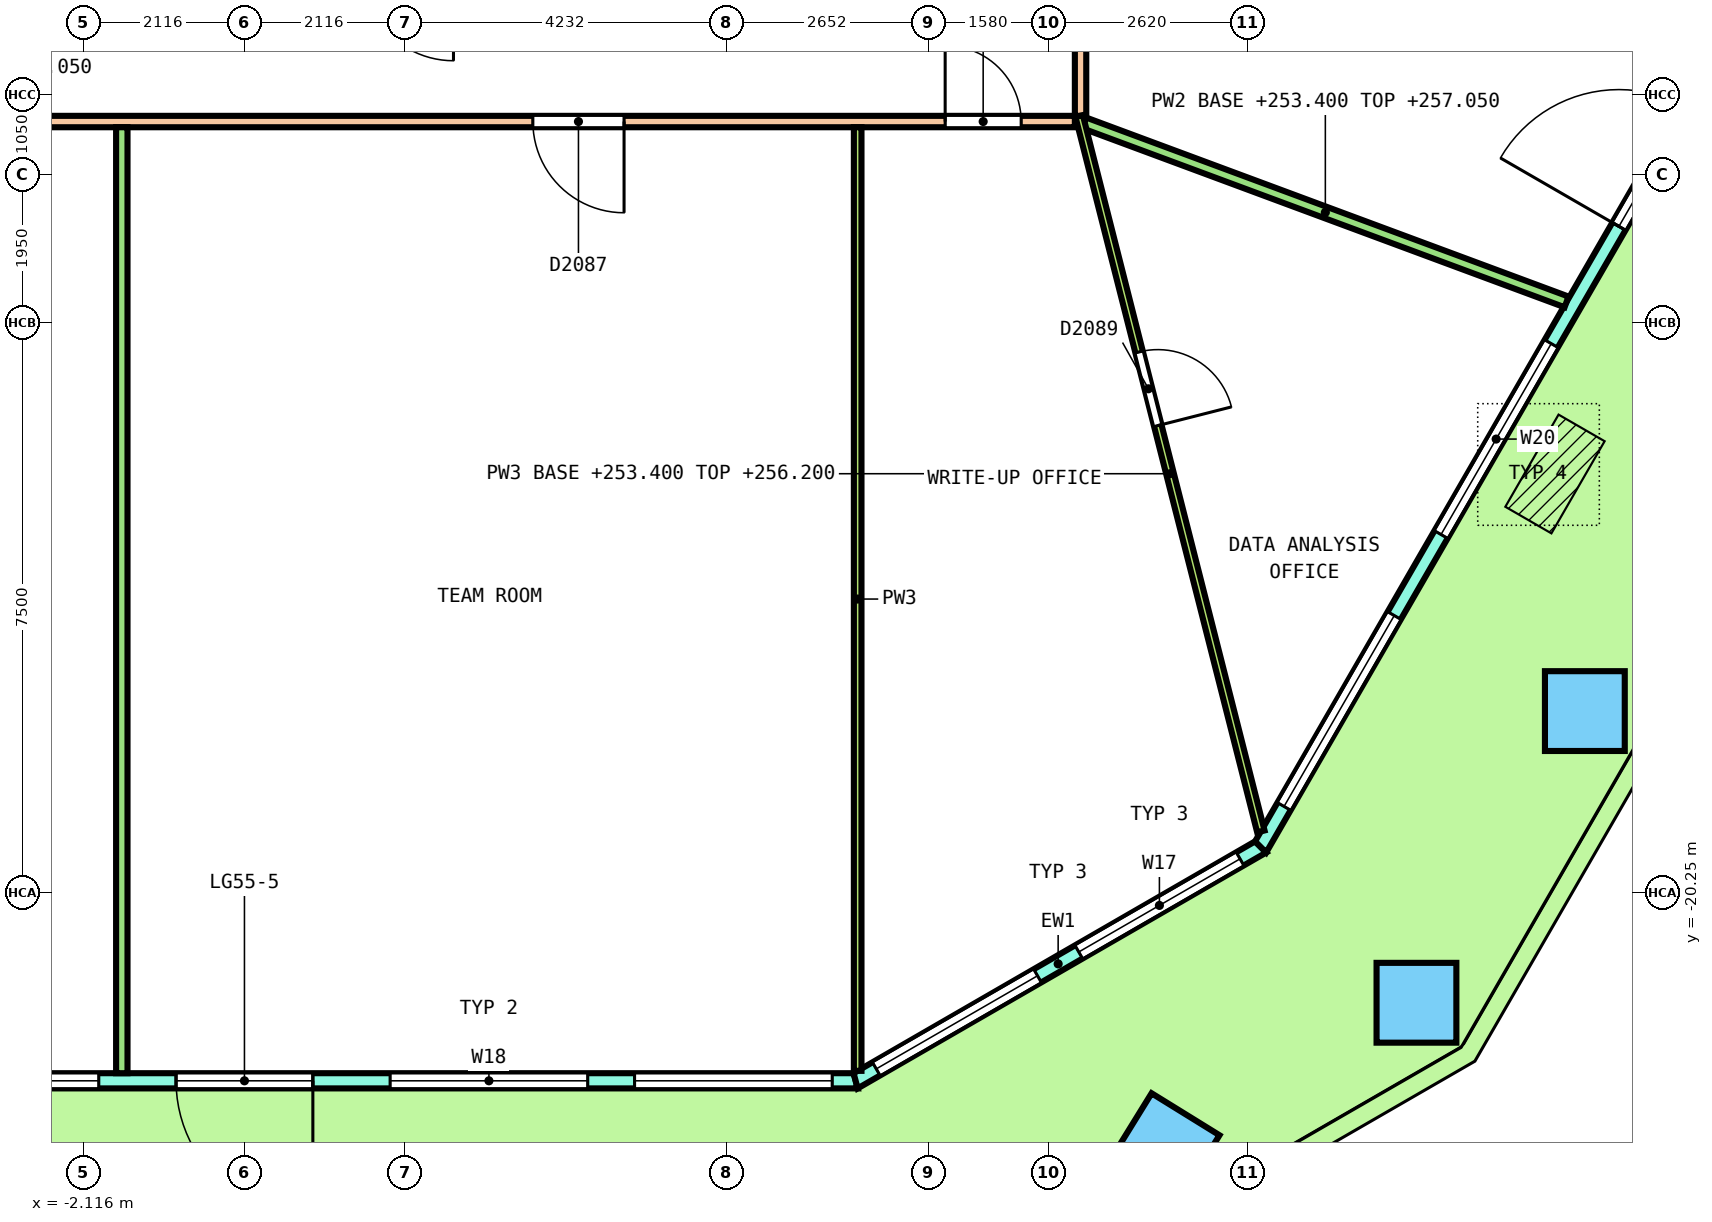
"""IFC4 building model, lengths in metres.
Left out: names, types, materials, properties, quantities, classifications, styles, units other than length and angle.
Written with IfcOpenShell. Run it as: python <this file> out.ifc"""

import sys

from ifc_helpers import new_model, si_unit, direction, frame, frame_2d, origin, origin_2d, place, context, subcontext, project, spatial, polyline, rectangle, outline, extrude, element, fill, save


model = new_model("IFC4")
c1 = context("Model", 3, precision=1e-05, world=origin(), true_north=direction((0.0, 1.0)))
c2 = subcontext(c1, "Body", "Model", "MODEL_VIEW")
j1 = project(units=[si_unit("LENGTHUNIT", "METRE"), si_unit("PLANEANGLEUNIT", "RADIAN")], contexts=[c1])
p1 = place(None, origin())
s1 = spatial("IfcSite", under=j1, at=p1, CompositionType="ELEMENT")
p2 = place(p1, origin())
s2 = spatial("IfcBuilding", under=s1, at=p2, CompositionType="ELEMENT")
p3 = place(p2, frame((0.0, 0.0, 253.4)))
s3 = spatial("IfcBuildingStorey", under=s2, at=p3, CompositionType="ELEMENT", Elevation=253.4)
for number, where, z_axis, x_axis in (
    (1, (12.105, -23.606, 0.0), (0.178, 0.308, 0.934), (0.853, 0.426, -0.303)),
    (2, (15.419, -21.693, 0.0), (0.178, 0.308, 0.934), (0.467, 0.809, -0.356)),
):
    element("IfcColumn", number, at=place(p3, frame(where, z_axis=z_axis, x_axis=x_axis)), inside=s3, PredefinedType="COLUMN", context=c2, shape_type="SweptSolid", body=[
        extrude(rectangle(XDim=1.05, YDim=1.05, at=origin_2d()), origin(), (0.0, 0.0, 1.0), 3.895),
    ])
p4 = place(p3, frame((17.635, -17.856, 0.0), z_axis=(0.111476147864, 0.193007383282, 0.974844202145), x_axis=(0.48748245992, 0.844204992977, -0.222887373134)))
e3 = element("IfcColumn", 3, at=p4, inside=s3, PredefinedType="COLUMN", context=c2, shape_type="SweptSolid", body=[
    extrude(rectangle(XDim=1.05, YDim=1.05, at=origin_2d()), origin(), (0.0, 0.0, 1.0), 3.734),
])
p5 = place(p3, frame((-8.041, -22.72, 0.0), z_axis=(0.0, 0.0, 1.0), x_axis=(1.0, 0.0, 0.0)))
e4 = element("IfcWall", 4, at=p5, inside=s3, PredefinedType="SOLIDWALL", context=c2, shape_type="SweptSolid", body=[
    extrude(outline(polyline([(-0.027, -0.1), (0.982, -0.1), (1.99, -0.1), (2.999, -0.1), (4.007, -0.1), (5.016, -0.1), (6.024, -0.1), (7.032, -0.1), (8.041, -0.1), (9.05, -0.1), (10.058, -0.1), (11.066, -0.1), (12.075, -0.1), (13.083, -0.1), (14.092, -0.1), (15.1, -0.1), (16.109, -0.1), (16.055, 0.1), (15.053, 0.1), (14.052, 0.1), (13.05, 0.1), (12.048, 0.1), (11.046, 0.1), (10.044, 0.1), (9.043, 0.1), (8.041, 0.1), (7.039, 0.1), (6.038, 0.1), (5.036, 0.1), (4.034, 0.1), (3.032, 0.1), (2.03, 0.1), (1.029, 0.1), (0.027, 0.1), (-0.027, -0.1)])), origin(), (0.0, 0.0, 1.0), 3.7),
])
p6 = place(p5, frame((0.308, 0.0, 0.1)))
e5 = element("IfcOpeningElement", 5, at=p6, cuts=e4, PredefinedType="OPENING", context=c2, shape_type="SweptSolid", body=[
    extrude(rectangle(XDim=2.6, YDim=2.65, at=frame_2d((1.3, 1.325))), frame((0.0, 0.11, 0.0), z_axis=(0.0, -1.0, 0.0), x_axis=(1.0, 0.0, 0.0)), (0.0, 0.0, 1.0), 0.22),
])
p7 = place(p5, frame((3.524, 0.0, 0.1)))
e6 = element("IfcOpeningElement", 6, at=p7, cuts=e4, PredefinedType="OPENING", context=c2, shape_type="SweptSolid", body=[
    extrude(rectangle(XDim=2.6, YDim=2.65, at=frame_2d((1.3, 1.325))), frame((0.0, 0.11, 0.0), z_axis=(0.0, -1.0, 0.0), x_axis=(1.0, 0.0, 0.0)), (0.0, 0.0, 1.0), 0.22),
])
p8 = place(p5, frame((7.141, 0.0, 0.0)))
e7 = element("IfcOpeningElement", 7, at=p8, cuts=e4, PredefinedType="OPENING", context=c2, shape_type="SweptSolid", body=[
    extrude(rectangle(XDim=1.8, YDim=2.4, at=frame_2d((0.9, 1.2))), frame((0.0, 0.11, 0.0), z_axis=(0.0, -1.0, 0.0), x_axis=(1.0, 0.0, 0.0)), (0.0, 0.0, 1.0), 0.22),
])
p9 = place(p5, frame((7.141, 0.0, 2.55)))
e8 = element("IfcOpeningElement", 8, at=p9, cuts=e4, PredefinedType="OPENING", context=c2, shape_type="SweptSolid", body=[
    extrude(rectangle(XDim=1.8, YDim=0.2, at=frame_2d((0.9, 0.1))), frame((0.0, 0.11, 0.0), z_axis=(0.0, -1.0, 0.0), x_axis=(1.0, 0.0, 0.0)), (0.0, 0.0, 1.0), 0.22),
])
p10 = place(p5, frame((9.957, 0.0, 0.1)))
e9 = element("IfcOpeningElement", 9, at=p10, cuts=e4, PredefinedType="OPENING", context=c2, shape_type="SweptSolid", body=[
    extrude(rectangle(XDim=2.6, YDim=2.65, at=frame_2d((1.3, 1.325))), frame((0.0, 0.11, 0.0), z_axis=(0.0, -1.0, 0.0), x_axis=(1.0, 0.0, 0.0)), (0.0, 0.0, 1.0), 0.22),
])
p11 = place(p5, frame((13.174, 0.0, 0.1)))
e10 = element("IfcOpeningElement", 10, at=p11, cuts=e4, PredefinedType="OPENING", context=c2, shape_type="SweptSolid", body=[
    extrude(rectangle(XDim=2.6, YDim=2.65, at=frame_2d((1.3, 1.325))), frame((0.0, 0.11, 0.0), z_axis=(0.0, -1.0, 0.0), x_axis=(1.0, 0.0, 0.0)), (0.0, 0.0, 1.0), 0.22),
])
p12 = place(p3, frame((8.041, -22.72, 0.0), z_axis=(0.0, 0.0, 1.0), x_axis=(0.866002544807, 0.50003959082, 0.0)))
e11 = element("IfcWall", 11, at=p12, inside=s3, PredefinedType="SOLIDWALL", context=c2, shape_type="SweptSolid", body=[
    extrude(outline(polyline([(-0.027, -0.1), (1.008, -0.1), (2.042, -0.1), (3.076, -0.1), (4.111, -0.1), (5.145, -0.1), (6.18, -0.1), (6.126, 0.1), (5.109, 0.1), (4.093, 0.1), (3.076, 0.1), (2.06, 0.1), (1.043, 0.1), (0.027, 0.1), (-0.027, -0.1)])), origin(), (0.0, 0.0, 1.0), 3.7),
])
p13 = place(p12, frame((0.313, 0.0, 0.1)))
e12 = element("IfcOpeningElement", 12, at=p13, cuts=e11, PredefinedType="OPENING", context=c2, shape_type="SweptSolid", body=[
    extrude(rectangle(XDim=2.45, YDim=2.65, at=frame_2d((1.225, 1.325))), frame((0.0, 0.11, 0.0), z_axis=(0.0, -1.0, 0.0), x_axis=(1.0, 0.0, 0.0)), (0.0, 0.0, 1.0), 0.22),
])
p14 = place(p12, frame((3.39, 0.0, 0.1)))
e13 = element("IfcOpeningElement", 13, at=p14, cuts=e11, PredefinedType="OPENING", context=c2, shape_type="SweptSolid", body=[
    extrude(rectangle(XDim=2.45, YDim=2.65, at=frame_2d((1.225, 1.325))), frame((0.0, 0.11, 0.0), z_axis=(0.0, -1.0, 0.0), x_axis=(1.0, 0.0, 0.0)), (0.0, 0.0, 1.0), 0.22),
])
p15 = place(p3, frame((13.369, -19.643, 0.0), z_axis=(0.0, 0.0, 1.0), x_axis=(0.500000087574, 0.866025353224, 0.0)))
e14 = element("IfcWall", 14, at=p15, inside=s3, PredefinedType="SOLIDWALL", context=c2, shape_type="SweptSolid", body=[
    extrude(outline(polyline([(-0.027, -0.1), (1.009, -0.1), (2.044, -0.1), (3.079, -0.1), (4.115, -0.1), (5.15, -0.1), (6.185, -0.1), (7.221, -0.1), (8.256, -0.1), (9.292, -0.1), (10.327, -0.1), (11.362, -0.1), (12.398, -0.1), (13.433, -0.1), (14.469, -0.1), (15.504, -0.1), (16.539, -0.1), (17.574, -0.1), (18.61, -0.1), (19.645, -0.1), (20.681, -0.1), (20.627, 0.1), (19.597, 0.1), (18.567, 0.1), (17.537, 0.1), (16.507, 0.1), (15.477, 0.1), (14.447, 0.1), (13.417, 0.1), (12.387, 0.1), (11.357, 0.1), (10.327, 0.1), (9.297, 0.1), (8.267, 0.1), (7.237, 0.1), (6.207, 0.1), (5.177, 0.1), (4.147, 0.1), (3.117, 0.1), (2.087, 0.1), (1.057, 0.1), (0.027, 0.1), (-0.027, -0.1)])), origin(), (0.0, 0.0, 1.0), 3.7),
])
p16 = place(p15, frame((0.615, 0.0, 0.1)))
e15 = element("IfcOpeningElement", 15, at=p16, cuts=e14, PredefinedType="OPENING", context=c2, shape_type="SweptSolid", body=[
    extrude(rectangle(XDim=2.9, YDim=2.65, at=frame_2d((1.45, 1.325))), frame((0.0, 0.11, 0.0), z_axis=(0.0, -1.0, 0.0), x_axis=(1.0, 0.0, 0.0)), (0.0, 0.0, 1.0), 0.22),
])
p17 = place(p15, frame((4.746, 0.0, 0.1)))
e16 = element("IfcOpeningElement", 16, at=p17, cuts=e14, PredefinedType="OPENING", context=c2, shape_type="SweptSolid", body=[
    extrude(rectangle(XDim=2.9, YDim=2.65, at=frame_2d((1.45, 1.325))), frame((0.0, 0.11, 0.0), z_axis=(0.0, -1.0, 0.0), x_axis=(1.0, 0.0, 0.0)), (0.0, 0.0, 1.0), 0.22),
])
p18 = place(p15, frame((9.427, 0.0, 0.0)))
e17 = element("IfcOpeningElement", 17, at=p18, cuts=e14, PredefinedType="OPENING", context=c2, shape_type="SweptSolid", body=[
    extrude(rectangle(XDim=1.8, YDim=2.4, at=frame_2d((0.9, 1.2))), frame((0.0, 0.11, 0.0), z_axis=(0.0, -1.0, 0.0), x_axis=(1.0, 0.0, 0.0)), (0.0, 0.0, 1.0), 0.22),
])
p19 = place(p15, frame((9.427, 0.0, 2.55)))
e18 = element("IfcOpeningElement", 18, at=p19, cuts=e14, PredefinedType="OPENING", context=c2, shape_type="SweptSolid", body=[
    extrude(rectangle(XDim=1.8, YDim=0.2, at=frame_2d((0.9, 0.1))), frame((0.0, 0.11, 0.0), z_axis=(0.0, -1.0, 0.0), x_axis=(1.0, 0.0, 0.0)), (0.0, 0.0, 1.0), 0.22),
])
p20 = place(p15, frame((13.008, 0.0, 0.1)))
e19 = element("IfcOpeningElement", 19, at=p20, cuts=e14, PredefinedType="OPENING", context=c2, shape_type="SweptSolid", body=[
    extrude(rectangle(XDim=2.9, YDim=2.65, at=frame_2d((1.45, 1.325))), frame((0.0, 0.11, 0.0), z_axis=(0.0, -1.0, 0.0), x_axis=(1.0, 0.0, 0.0)), (0.0, 0.0, 1.0), 0.22),
])
p21 = place(p15, frame((17.139, 0.0, 0.1)))
e20 = element("IfcOpeningElement", 20, at=p21, cuts=e14, PredefinedType="OPENING", context=c2, shape_type="SweptSolid", body=[
    extrude(rectangle(XDim=2.9, YDim=2.65, at=frame_2d((1.45, 1.325))), frame((0.0, 0.11, 0.0), z_axis=(0.0, -1.0, 0.0), x_axis=(1.0, 0.0, 0.0)), (0.0, 0.0, 1.0), 0.22),
])
p22 = place(p3, frame((11.0, -10.025, 0.0), z_axis=(0.0, 0.0, 1.0), x_axis=(0.0, 1.0, 0.0)))
e21 = element("IfcWall", 21, at=p22, inside=s3, PredefinedType="PARTITIONING", context=c2, shape_type="SweptSolid", body=[
    extrude(rectangle(XDim=17.175, YDim=0.15, at=frame_2d((8.587, 0.0))), origin(), (0.0, 0.0, 1.0), 2.8),
])
p23 = place(p22, frame((10.4, 0.0, 0.0)))
e22 = element("IfcOpeningElement", 22, at=p23, cuts=e21, PredefinedType="OPENING", context=c2, shape_type="SweptSolid", body=[
    extrude(rectangle(XDim=1.0, YDim=2.1, at=frame_2d((0.5, 1.05))), frame((0.0, 0.085, 0.0), z_axis=(0.0, -1.0, 0.0), x_axis=(1.0, 0.0, 0.0)), (0.0, 0.0, 1.0), 0.17),
])
p24 = place(p22, frame((2.521, 0.0, 0.0)))
e23 = element("IfcOpeningElement", 23, at=p24, cuts=e21, PredefinedType="OPENING", context=c2, shape_type="SweptSolid", body=[
    extrude(rectangle(XDim=1.2, YDim=2.1, at=frame_2d((0.6, 1.05))), frame((0.0, 0.085, 0.0), z_axis=(0.0, -1.0, 0.0), x_axis=(1.0, 0.0, 0.0)), (0.0, 0.0, 1.0), 0.17),
])
p25 = place(p3, frame((-10.95, -10.1, 0.0), z_axis=(0.0, 0.0, 1.0), x_axis=(1.0, 0.0, 0.0)))
e24 = element("IfcWall", 24, at=p25, inside=s3, PredefinedType="PARTITIONING", context=c2, shape_type="SweptSolid", body=[
    extrude(rectangle(XDim=21.875, YDim=0.15, at=frame_2d((10.938, 0.0))), origin(), (0.0, 0.0, 1.0), 2.8),
])
p26 = place(p25, frame((3.079, 0.0, 0.0)))
e25 = element("IfcOpeningElement", 25, at=p26, cuts=e24, PredefinedType="OPENING", context=c2, shape_type="SweptSolid", body=[
    extrude(rectangle(XDim=1.2, YDim=2.1, at=frame_2d((0.6, 1.05))), frame((0.0, 0.085, 0.0), z_axis=(0.0, -1.0, 0.0), x_axis=(1.0, 0.0, 0.0)), (0.0, 0.0, 1.0), 0.17),
])
p27 = place(p25, frame((14.744, 0.0, 0.0)))
e26 = element("IfcOpeningElement", 26, at=p27, cuts=e24, PredefinedType="OPENING", context=c2, shape_type="SweptSolid", body=[
    extrude(rectangle(XDim=1.2, YDim=2.1, at=frame_2d((0.6, 1.05))), frame((0.0, 0.085, 0.0), z_axis=(0.0, -1.0, 0.0), x_axis=(1.0, 0.0, 0.0)), (0.0, 0.0, 1.0), 0.17),
])
p28 = place(p25, frame((20.169, 0.0, 0.0)))
e27 = element("IfcOpeningElement", 27, at=p28, cuts=e24, PredefinedType="OPENING", context=c2, shape_type="SweptSolid", body=[
    extrude(rectangle(XDim=1.0, YDim=2.1, at=frame_2d((0.5, 1.05))), frame((0.0, 0.085, 0.0), z_axis=(0.0, -1.0, 0.0), x_axis=(1.0, 0.0, 0.0)), (0.0, 0.0, 1.0), 0.17),
])
p29 = place(p3, frame((-1.614, -22.62, 0.0), z_axis=(0.0, 0.0, 1.0), x_axis=(0.0, 1.0, 0.0)))
e28 = element("IfcWall", 28, at=p29, inside=s3, PredefinedType="PARTITIONING", context=c2, shape_type="SweptSolid", body=[
    extrude(rectangle(XDim=12.445, YDim=0.15, at=frame_2d((6.222, 0.0))), origin(), (0.0, 0.0, 1.0), 2.8),
])
p30 = place(p3, frame((11.047, -10.117, 0.0), z_axis=(0.0, 0.0, 1.0), x_axis=(0.937524105554, -0.347920323501, 0.0)))
e29 = element("IfcWall", 29, at=p30, inside=s3, PredefinedType="PARTITIONING", context=c2, shape_type="SweptSolid", body=[
    extrude(rectangle(XDim=6.77, YDim=0.15, at=frame_2d((3.385, 0.0))), origin(), (0.0, 0.0, 1.0), 3.65),
])
p31 = place(p3, frame((8.068, -22.589, 0.0), z_axis=(0.0, 0.0, 1.0), x_axis=(0.0, 1.0, 0.0)))
e30 = element("IfcWall", 30, at=p31, inside=s3, PredefinedType="PARTITIONING", context=c2, shape_type="SweptSolid", body=[
    extrude(rectangle(XDim=12.414, YDim=0.1, at=frame_2d((6.207, 0.0))), origin(), (0.0, 0.0, 1.0), 2.8),
])
p32 = place(p3, frame((10.981, -10.027, 0.0), z_axis=(0.0, 0.0, 1.0), x_axis=(0.246189836145, -0.969221628204, 0.0)))
e31 = element("IfcWall", 31, at=p32, inside=s3, PredefinedType="PARTITIONING", context=c2, shape_type="SweptSolid", body=[
    extrude(rectangle(XDim=9.71, YDim=0.1, at=frame_2d((4.855, 0.0))), origin(), (0.0, 0.0, 1.0), 2.8),
])
p33 = place(p32, frame((3.202, 0.0, 0.0)))
e32 = element("IfcOpeningElement", 32, at=p33, cuts=e31, PredefinedType="OPENING", context=c2, shape_type="SweptSolid", body=[
    extrude(rectangle(XDim=1.0, YDim=2.1, at=frame_2d((0.5, 1.05))), frame((0.0, 0.06, 0.0), z_axis=(0.0, -1.0, 0.0), x_axis=(1.0, 0.0, 0.0)), (0.0, 0.0, 1.0), 0.12),
])
p34 = place(p7, origin())
e33 = element("IfcWindow", 33, at=p34, inside=s3, PartitioningType="SINGLE_PANEL", PredefinedType="WINDOW", context=c2, shape_type="SweptSolid", body=[
    extrude(rectangle(XDim=2.6, YDim=2.65, at=frame_2d((1.3, 1.325))), frame((0.0, 0.03, 0.0), z_axis=(0.0, -1.0, 0.0), x_axis=(1.0, 0.0, 0.0)), (0.0, 0.0, 1.0), 0.06),
])
fill(e6, e33)
p35 = place(p8, origin())
e34 = element("IfcDoor", 34, at=p35, inside=s3, OperationType="DOUBLE_DOOR_SINGLE_SWING", PredefinedType="DOOR", context=c2, shape_type="SweptSolid", body=[
    extrude(rectangle(XDim=1.8, YDim=2.4, at=frame_2d((0.9, 1.2))), frame((0.0, 0.025, 0.0), z_axis=(0.0, -1.0, 0.0), x_axis=(1.0, 0.0, 0.0)), (0.0, 0.0, 1.0), 0.05),
])
fill(e7, e34)
p36 = place(p9, origin())
e35 = element("IfcWindow", 35, at=p36, inside=s3, PartitioningType="SINGLE_PANEL", PredefinedType="WINDOW", context=c2, shape_type="SweptSolid", body=[
    extrude(rectangle(XDim=1.8, YDim=0.2, at=frame_2d((0.9, 0.1))), frame((0.0, 0.03, 0.0), z_axis=(0.0, -1.0, 0.0), x_axis=(1.0, 0.0, 0.0)), (0.0, 0.0, 1.0), 0.06),
])
fill(e8, e35)
p37 = place(p10, origin())
e36 = element("IfcWindow", 36, at=p37, inside=s3, PartitioningType="SINGLE_PANEL", PredefinedType="WINDOW", context=c2, shape_type="SweptSolid", body=[
    extrude(rectangle(XDim=2.6, YDim=2.65, at=frame_2d((1.3, 1.325))), frame((0.0, 0.03, 0.0), z_axis=(0.0, -1.0, 0.0), x_axis=(1.0, 0.0, 0.0)), (0.0, 0.0, 1.0), 0.06),
])
fill(e9, e36)
p38 = place(p11, origin())
e37 = element("IfcWindow", 37, at=p38, inside=s3, PartitioningType="SINGLE_PANEL", PredefinedType="WINDOW", context=c2, shape_type="SweptSolid", body=[
    extrude(rectangle(XDim=2.6, YDim=2.65, at=frame_2d((1.3, 1.325))), frame((0.0, 0.03, 0.0), z_axis=(0.0, -1.0, 0.0), x_axis=(1.0, 0.0, 0.0)), (0.0, 0.0, 1.0), 0.06),
])
fill(e10, e37)
p39 = place(p13, origin())
e38 = element("IfcWindow", 38, at=p39, inside=s3, PartitioningType="SINGLE_PANEL", PredefinedType="WINDOW", context=c2, shape_type="SweptSolid", body=[
    extrude(rectangle(XDim=2.45, YDim=2.65, at=frame_2d((1.225, 1.325))), frame((0.0, 0.03, 0.0), z_axis=(0.0, -1.0, 0.0), x_axis=(1.0, 0.0, 0.0)), (0.0, 0.0, 1.0), 0.06),
])
fill(e12, e38)
p40 = place(p14, origin())
e39 = element("IfcWindow", 39, at=p40, inside=s3, PartitioningType="SINGLE_PANEL", PredefinedType="WINDOW", context=c2, shape_type="SweptSolid", body=[
    extrude(rectangle(XDim=2.45, YDim=2.65, at=frame_2d((1.225, 1.325))), frame((0.0, 0.03, 0.0), z_axis=(0.0, -1.0, 0.0), x_axis=(1.0, 0.0, 0.0)), (0.0, 0.0, 1.0), 0.06),
])
fill(e13, e39)
p41 = place(p16, origin())
e40 = element("IfcWindow", 40, at=p41, inside=s3, PartitioningType="SINGLE_PANEL", PredefinedType="WINDOW", context=c2, shape_type="SweptSolid", body=[
    extrude(rectangle(XDim=2.9, YDim=2.65, at=frame_2d((1.45, 1.325))), frame((0.0, 0.03, 0.0), z_axis=(0.0, -1.0, 0.0), x_axis=(1.0, 0.0, 0.0)), (0.0, 0.0, 1.0), 0.06),
])
fill(e15, e40)
p42 = place(p17, origin())
e41 = element("IfcWindow", 41, at=p42, inside=s3, PartitioningType="SINGLE_PANEL", PredefinedType="WINDOW", context=c2, shape_type="SweptSolid", body=[
    extrude(rectangle(XDim=2.9, YDim=2.65, at=frame_2d((1.45, 1.325))), frame((0.0, 0.03, 0.0), z_axis=(0.0, -1.0, 0.0), x_axis=(1.0, 0.0, 0.0)), (0.0, 0.0, 1.0), 0.06),
])
fill(e16, e41)
p43 = place(p18, origin())
e42 = element("IfcDoor", 42, at=p43, inside=s3, OperationType="DOUBLE_DOOR_SINGLE_SWING", PredefinedType="DOOR", context=c2, shape_type="SweptSolid", body=[
    extrude(rectangle(XDim=1.8, YDim=2.4, at=frame_2d((0.9, 1.2))), frame((0.0, 0.025, 0.0), z_axis=(0.0, -1.0, 0.0), x_axis=(1.0, 0.0, 0.0)), (0.0, 0.0, 1.0), 0.05),
])
fill(e17, e42)
p44 = place(p19, origin())
e43 = element("IfcWindow", 43, at=p44, inside=s3, PartitioningType="SINGLE_PANEL", PredefinedType="WINDOW", context=c2, shape_type="SweptSolid", body=[
    extrude(rectangle(XDim=1.8, YDim=0.2, at=frame_2d((0.9, 0.1))), frame((0.0, 0.03, 0.0), z_axis=(0.0, -1.0, 0.0), x_axis=(1.0, 0.0, 0.0)), (0.0, 0.0, 1.0), 0.06),
])
fill(e18, e43)
p45 = place(p27, origin())
e44 = element("IfcDoor", 44, at=p45, inside=s3, OperationType="DOUBLE_DOOR_SINGLE_SWING", PredefinedType="DOOR", context=c2, shape_type="SweptSolid", body=[
    extrude(rectangle(XDim=1.2, YDim=2.1, at=frame_2d((0.6, 1.05))), frame((0.0, 0.025, 0.0), z_axis=(0.0, -1.0, 0.0), x_axis=(1.0, 0.0, 0.0)), (0.0, 0.0, 1.0), 0.05),
])
fill(e26, e44)
p46 = place(p28, origin())
e45 = element("IfcDoor", 45, at=p46, inside=s3, OperationType="SINGLE_SWING_LEFT", PredefinedType="DOOR", context=c2, shape_type="SweptSolid", body=[
    extrude(rectangle(XDim=1.0, YDim=2.1, at=frame_2d((0.5, 1.05))), frame((0.0, 0.025, 0.0), z_axis=(0.0, -1.0, 0.0), x_axis=(1.0, 0.0, 0.0)), (0.0, 0.0, 1.0), 0.05),
])
fill(e27, e45)
p47 = place(p33, origin())
e46 = element("IfcDoor", 46, at=p47, inside=s3, OperationType="SINGLE_SWING_RIGHT", PredefinedType="DOOR", context=c2, shape_type="SweptSolid", body=[
    extrude(rectangle(XDim=1.0, YDim=2.1, at=frame_2d((0.5, 1.05))), frame((0.0, 0.025, 0.0), z_axis=(0.0, -1.0, 0.0), x_axis=(1.0, 0.0, 0.0)), (0.0, 0.0, 1.0), 0.05),
])
fill(e32, e46)
save(model, sys.argv[1])
